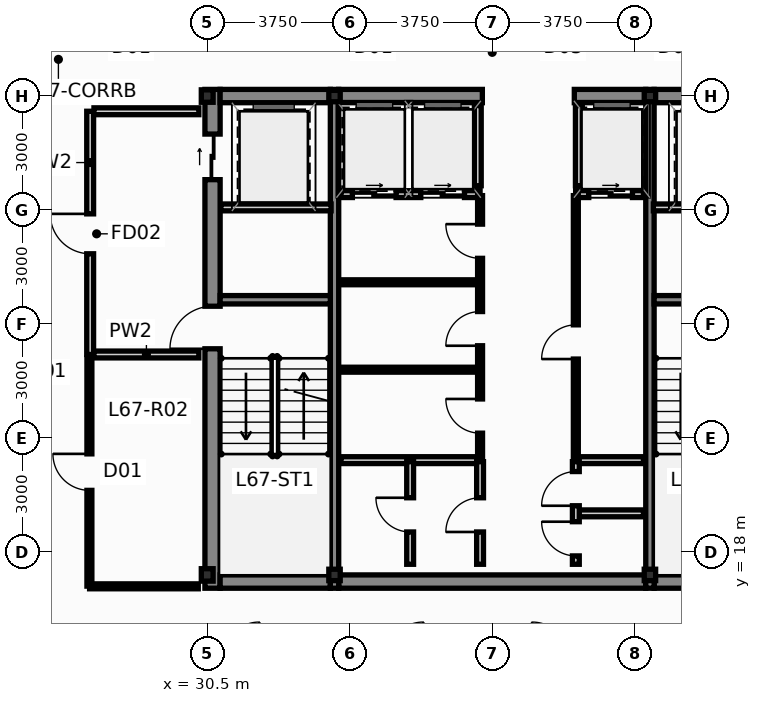
"""IFC4 building model, lengths in metres.
Left out: names, types, materials, properties, quantities, classifications, styles, units other than length and angle.
Written with IfcOpenShell. Run it as: python <this file> out.ifc"""

import sys

from ifc_helpers import new_model, si_unit, direction, frame, frame_2d, origin, origin_2d, place, context, subcontext, project, spatial, rectangle, hollow_rectangle, i_section, extrude, source, transform, mapped, element, fill, save


model = new_model("IFC4")
c1 = context("Model", 3, precision=1e-05, world=origin(), true_north=direction((0.0, 1.0)))
c2 = subcontext(c1, "Body", "Model", "MODEL_VIEW")
j1 = project(units=[si_unit("LENGTHUNIT", "METRE"), si_unit("PLANEANGLEUNIT", "RADIAN")], contexts=[c1])
p1 = place(None, origin())
s1 = spatial("IfcSite", under=j1, at=p1, CompositionType="ELEMENT")
p2 = place(p1, origin())
s2 = spatial("IfcBuilding", under=s1, at=p2, CompositionType="ELEMENT")
p3 = place(p2, frame((0.0, 0.0, 255.4)))
s3 = spatial("IfcBuildingStorey", under=s2, at=p3, CompositionType="ELEMENT", Elevation=255.4)
m1 = source(origin(), c2, "Body", "SweptSolid", [
    extrude(i_section(OverallWidth=0.311, OverallDepth=0.327, WebThickness=0.016, FlangeThickness=0.025, at=origin_2d()), origin(), (0.0, 0.0, 1.0), 3.65),
])
for number, where, z_axis, x_axis in (
    (1, (30.5, 17.4, 0.0), (0.0, 0.0, 1.0), (1.0, 0.0, 0.0)),
    (2, (30.5, 30.0, 0.0), (0.0, 0.0, 1.0), (1.0, 0.0, 0.0)),
):
    element("IfcColumn", number, at=place(p3, frame(where, z_axis=z_axis, x_axis=x_axis)), inside=s3, PredefinedType="COLUMN", context=c2, shape_type="MappedRepresentation", body=[
        mapped(m1, transform((0.0, 0.0, 0.0), scale=1.0)),
    ])
m2 = source(origin(), c2, "Body", "SweptSolid", [
    extrude(hollow_rectangle(XDim=0.3, YDim=0.3, WallThickness=0.012, at=origin_2d()), origin(), (0.0, 0.0, 1.0), 3.65),
])
for number, where, z_axis, x_axis in (
    (3, (33.85, 17.4, 0.0), (0.0, 0.0, 1.0), (1.0, 0.0, 0.0)),
    (4, (42.15, 17.4, 0.0), (0.0, 0.0, 1.0), (1.0, 0.0, 0.0)),
    (5, (33.85, 30.0, 0.0), (0.0, 0.0, 1.0), (1.0, 0.0, 0.0)),
    (6, (42.15, 30.0, 0.0), (0.0, 0.0, 1.0), (1.0, 0.0, 0.0)),
):
    element("IfcColumn", number, at=place(p3, frame(where, z_axis=z_axis, x_axis=x_axis)), inside=s3, PredefinedType="COLUMN", context=c2, shape_type="MappedRepresentation", body=[
        mapped(m2, transform((0.0, 0.0, 0.0), scale=1.0)),
    ])
p4 = place(p3, frame((30.64, 17.05, 0.0), z_axis=(0.0, 0.0, 1.0), x_axis=(0.0, 1.0, 0.0)))
e7 = element("IfcWall", 7, at=p4, inside=s3, PredefinedType="SHEAR", context=c2, shape_type="SweptSolid", body=[
    extrude(rectangle(XDim=13.125, YDim=0.4, at=frame_2d((6.562, 0.0))), origin(), (0.0, 0.0, 1.0), 3.65),
])
p5 = place(p4, frame((6.3, 0.0, 0.0)))
e8 = element("IfcOpeningElement", 8, at=p5, cuts=e7, PredefinedType="OPENING", context=c2, shape_type="SweptSolid", body=[
    extrude(rectangle(XDim=1.12, YDim=2.15, at=frame_2d((0.56, 1.075))), frame((0.0, 0.212, 0.0), z_axis=(0.0, -1.0, 0.0), x_axis=(1.0, 0.0, 0.0)), (0.0, 0.0, 1.0), 0.424),
])
p6 = place(p4, frame((10.75, 0.0, 0.0)))
e9 = element("IfcOpeningElement", 9, at=p6, cuts=e7, PredefinedType="OPENING", context=c2, shape_type="SweptSolid", body=[
    extrude(rectangle(XDim=1.2, YDim=2.2, at=frame_2d((0.6, 1.1))), frame((0.0, 0.212, 0.0), z_axis=(0.0, -1.0, 0.0), x_axis=(1.0, 0.0, 0.0)), (0.0, 0.0, 1.0), 0.424),
])
p7 = place(p3, frame((30.84, 17.225, 0.0), z_axis=(0.0, 0.0, 1.0), x_axis=(1.0, 0.0, 0.0)))
e10 = element("IfcWall", 10, at=p7, inside=s3, PredefinedType="SHEAR", context=c2, shape_type="SweptSolid", body=[
    extrude(rectangle(XDim=2.9, YDim=0.35, at=frame_2d((1.45, 0.0))), origin(), (0.0, 0.0, 1.0), 3.65),
])
p8 = place(p3, frame((33.96, 17.225, 0.0), z_axis=(0.0, 0.0, 1.0), x_axis=(1.0, 0.0, 0.0)))
e11 = element("IfcWall", 11, at=p8, inside=s3, PredefinedType="SHEAR", context=c2, shape_type="SweptSolid", body=[
    extrude(rectangle(XDim=8.08, YDim=0.35, at=frame_2d((4.04, 0.0))), origin(), (0.0, 0.0, 1.0), 3.65),
])
for number, where, z_axis, x_axis in (
    (12, (42.26, 17.225, 0.0), (0.0, 0.0, 1.0), (1.0, 0.0, 0.0)),
    (13, (30.84, 30.0, 0.0), (0.0, 0.0, 1.0), (1.0, 0.0, 0.0)),
):
    element("IfcWall", number, at=place(p3, frame(where, z_axis=z_axis, x_axis=x_axis)), inside=s3, PredefinedType="SHEAR", context=c2, shape_type="SweptSolid", body=[
        extrude(rectangle(XDim=2.9, YDim=0.35, at=frame_2d((1.45, 0.0))), origin(), (0.0, 0.0, 1.0), 3.65),
    ])
p9 = place(p3, frame((33.96, 30.0, 0.0), z_axis=(0.0, 0.0, 1.0), x_axis=(1.0, 0.0, 0.0)))
e14 = element("IfcWall", 14, at=p9, inside=s3, PredefinedType="SHEAR", context=c2, shape_type="SweptSolid", body=[
    extrude(rectangle(XDim=3.78, YDim=0.35, at=frame_2d((1.89, 0.0))), origin(), (0.0, 0.0, 1.0), 3.65),
])
p10 = place(p3, frame((40.16, 30.0, 0.0), z_axis=(0.0, 0.0, 1.0), x_axis=(1.0, 0.0, 0.0)))
e15 = element("IfcWall", 15, at=p10, inside=s3, PredefinedType="SHEAR", context=c2, shape_type="SweptSolid", body=[
    extrude(rectangle(XDim=1.88, YDim=0.35, at=frame_2d((0.94, 0.0))), origin(), (0.0, 0.0, 1.0), 3.65),
])
p11 = place(p3, frame((42.26, 30.0, 0.0), z_axis=(0.0, 0.0, 1.0), x_axis=(1.0, 0.0, 0.0)))
e16 = element("IfcWall", 16, at=p11, inside=s3, PredefinedType="SHEAR", context=c2, shape_type="SweptSolid", body=[
    extrude(rectangle(XDim=2.9, YDim=0.35, at=frame_2d((1.45, 0.0))), origin(), (0.0, 0.0, 1.0), 3.65),
])
for number, where, z_axis, x_axis in (
    (17, (33.85, 17.05, 0.0), (0.0, 0.0, 1.0), (0.0, 1.0, 0.0)),
    (18, (42.15, 17.05, 0.0), (0.0, 0.0, 1.0), (0.0, 1.0, 0.0)),
):
    element("IfcWall", number, at=place(p3, frame(where, z_axis=z_axis, x_axis=x_axis)), inside=s3, PredefinedType="SHEAR", context=c2, shape_type="SweptSolid", body=[
        extrude(rectangle(XDim=13.125, YDim=0.22, at=frame_2d((6.562, 0.0))), origin(), (0.0, 0.0, 1.0), 3.65),
    ])
for number, where, z_axis, x_axis in (
    (19, (30.84, 24.64, 0.0), (0.0, 0.0, 1.0), (1.0, 0.0, 0.0)),
    (20, (42.26, 24.64, 0.0), (0.0, 0.0, 1.0), (1.0, 0.0, 0.0)),
):
    element("IfcWall", number, at=place(p3, frame(where, z_axis=z_axis, x_axis=x_axis)), inside=s3, PredefinedType="SHEAR", context=c2, shape_type="SweptSolid", body=[
        extrude(rectangle(XDim=2.9, YDim=0.22, at=frame_2d((1.45, 0.0))), origin(), (0.0, 0.0, 1.0), 3.65),
    ])
p12 = place(p3, frame((34.02, 27.42, 0.0), z_axis=(0.0, 0.0, 1.0), x_axis=(1.0, 0.0, 0.0)))
e21 = element("IfcWall", 21, at=p12, inside=s3, PredefinedType="PARTITIONING", context=c2, shape_type="SweptSolid", body=[
    extrude(rectangle(XDim=3.66, YDim=0.18, at=frame_2d((1.83, 0.0))), origin(), (0.0, 0.0, 1.0), 3.4),
])
p13 = place(p12, frame((0.3, 0.0, 0.0)))
e22 = element("IfcOpeningElement", 22, at=p13, cuts=e21, PredefinedType="OPENING", context=c2, shape_type="SweptSolid", body=[
    extrude(rectangle(XDim=1.15, YDim=2.2, at=frame_2d((0.575, 1.1))), frame((0.0, 0.102, 0.0), z_axis=(0.0, -1.0, 0.0), x_axis=(1.0, 0.0, 0.0)), (0.0, 0.0, 1.0), 0.204),
])
p14 = place(p12, frame((2.1, 0.0, 0.0)))
e23 = element("IfcOpeningElement", 23, at=p14, cuts=e21, PredefinedType="OPENING", context=c2, shape_type="SweptSolid", body=[
    extrude(rectangle(XDim=1.15, YDim=2.2, at=frame_2d((0.575, 1.1))), frame((0.0, 0.102, 0.0), z_axis=(0.0, -1.0, 0.0), x_axis=(1.0, 0.0, 0.0)), (0.0, 0.0, 1.0), 0.204),
])
p15 = place(p3, frame((40.22, 27.42, 0.0), z_axis=(0.0, 0.0, 1.0), x_axis=(1.0, 0.0, 0.0)))
e24 = element("IfcWall", 24, at=p15, inside=s3, PredefinedType="PARTITIONING", context=c2, shape_type="SweptSolid", body=[
    extrude(rectangle(XDim=1.76, YDim=0.18, at=frame_2d((0.88, 0.0))), origin(), (0.0, 0.0, 1.0), 3.4),
])
p16 = place(p15, frame((0.32, 0.0, 0.0)))
e25 = element("IfcOpeningElement", 25, at=p16, cuts=e24, PredefinedType="OPENING", context=c2, shape_type="SweptSolid", body=[
    extrude(rectangle(XDim=1.15, YDim=2.2, at=frame_2d((0.575, 1.1))), frame((0.0, 0.102, 0.0), z_axis=(0.0, -1.0, 0.0), x_axis=(1.0, 0.0, 0.0)), (0.0, 0.0, 1.0), 0.204),
])
for number, where, z_axis, x_axis in (
    (26, (37.62, 27.64, 0.0), (0.0, 0.0, 1.0), (0.0, 1.0, 0.0)),
    (27, (40.28, 27.64, 0.0), (0.0, 0.0, 1.0), (0.0, 1.0, 0.0)),
):
    element("IfcWall", number, at=place(p3, frame(where, z_axis=z_axis, x_axis=x_axis)), inside=s3, PredefinedType="PARTITIONING", context=c2, shape_type="SweptSolid", body=[
        extrude(rectangle(XDim=2.11, YDim=0.18, at=frame_2d((1.055, 0.0))), origin(), (0.0, 0.0, 1.0), 3.4),
    ])
p17 = place(p3, frame((27.42, 23.2, 0.0), z_axis=(0.0, 0.0, 1.0), x_axis=(0.0, 1.0, 0.0)))
e28 = element("IfcWall", 28, at=p17, inside=s3, PredefinedType="PARTITIONING", context=c2, shape_type="SweptSolid", body=[
    extrude(rectangle(XDim=6.4, YDim=0.18, at=frame_2d((3.2, 0.0))), origin(), (0.0, 0.0, 1.0), 3.085),
])
p18 = place(p17, frame((2.65, 0.0, 0.0)))
e29 = element("IfcOpeningElement", 29, at=p18, cuts=e28, PredefinedType="OPENING", context=c2, shape_type="SweptSolid", body=[
    extrude(rectangle(XDim=1.05, YDim=2.15, at=frame_2d((0.525, 1.075))), frame((0.0, 0.102, 0.0), z_axis=(0.0, -1.0, 0.0), x_axis=(1.0, 0.0, 0.0)), (0.0, 0.0, 1.0), 0.204),
])
for number, where, z_axis, x_axis in (
    (30, (27.52, 23.2, 0.0), (0.0, 0.0, 1.0), (1.0, 0.0, 0.0)),
    (31, (27.52, 29.6, 0.0), (0.0, 0.0, 1.0), (1.0, 0.0, 0.0)),
):
    element("IfcWall", number, at=place(p3, frame(where, z_axis=z_axis, x_axis=x_axis)), inside=s3, PredefinedType="PARTITIONING", context=c2, shape_type="SweptSolid", body=[
        extrude(rectangle(XDim=2.76, YDim=0.18, at=frame_2d((1.38, 0.0))), origin(), (0.0, 0.0, 1.0), 3.4),
    ])
for number, where, z_axis, x_axis in (
    (32, (30.86, 27.07, 0.0), (0.0, 0.0, 1.0), (1.0, 0.0, 0.0)),
    (33, (42.24, 27.07, 0.0), (0.0, 0.0, 1.0), (1.0, 0.0, 0.0)),
):
    element("IfcWall", number, at=place(p3, frame(where, z_axis=z_axis, x_axis=x_axis)), inside=s3, PredefinedType="PARTITIONING", context=c2, shape_type="SweptSolid", body=[
        extrude(rectangle(XDim=2.9, YDim=0.18, at=frame_2d((1.45, 0.0))), origin(), (0.0, 0.0, 1.0), 3.4),
    ])
p19 = place(p3, frame((34.02, 20.42, 0.0), z_axis=(0.0, 0.0, 1.0), x_axis=(1.0, 0.0, 0.0)))
e34 = element("IfcWall", 34, at=p19, inside=s3, PredefinedType="PARTITIONING", context=c2, shape_type="SweptSolid", body=[
    extrude(rectangle(XDim=3.64, YDim=0.18, at=frame_2d((1.82, 0.0))), origin(), (0.0, 0.0, 1.0), 3.4),
])
p20 = place(p3, frame((40.22, 20.42, 0.0), z_axis=(0.0, 0.0, 1.0), x_axis=(1.0, 0.0, 0.0)))
e35 = element("IfcWall", 35, at=p20, inside=s3, PredefinedType="PARTITIONING", context=c2, shape_type="SweptSolid", body=[
    extrude(rectangle(XDim=1.76, YDim=0.18, at=frame_2d((0.88, 0.0))), origin(), (0.0, 0.0, 1.0), 3.4),
])
for number, where, z_axis, x_axis in (
    (36, (34.02, 22.8, 0.0), (0.0, 0.0, 1.0), (1.0, 0.0, 0.0)),
    (37, (34.02, 25.1, 0.0), (0.0, 0.0, 1.0), (1.0, 0.0, 0.0)),
):
    element("IfcWall", number, at=place(p3, frame(where, z_axis=z_axis, x_axis=x_axis)), inside=s3, PredefinedType="PARTITIONING", context=c2, shape_type="SweptSolid", body=[
        extrude(rectangle(XDim=3.58, YDim=0.13, at=frame_2d((1.79, 0.0))), origin(), (0.0, 0.0, 1.0), 3.4),
    ])
p21 = place(p3, frame((37.68, 20.48, 0.0), z_axis=(0.0, 0.0, 1.0), x_axis=(0.0, 1.0, 0.0)))
e38 = element("IfcWall", 38, at=p21, inside=s3, PredefinedType="PARTITIONING", context=c2, shape_type="SweptSolid", body=[
    extrude(rectangle(XDim=6.9, YDim=0.13, at=frame_2d((3.45, 0.0))), origin(), (0.0, 0.0, 1.0), 3.4),
])
p22 = place(p21, frame((0.65, 0.0, 0.0)))
e39 = element("IfcOpeningElement", 39, at=p22, cuts=e38, PredefinedType="OPENING", context=c2, shape_type="SweptSolid", body=[
    extrude(rectangle(XDim=0.9, YDim=2.1, at=frame_2d((0.45, 1.05))), frame((0.0, 0.077, 0.0), z_axis=(0.0, -1.0, 0.0), x_axis=(1.0, 0.0, 0.0)), (0.0, 0.0, 1.0), 0.154),
])
p23 = place(p21, frame((2.95, 0.0, 0.0)))
e40 = element("IfcOpeningElement", 40, at=p23, cuts=e38, PredefinedType="OPENING", context=c2, shape_type="SweptSolid", body=[
    extrude(rectangle(XDim=0.9, YDim=2.1, at=frame_2d((0.45, 1.05))), frame((0.0, 0.077, 0.0), z_axis=(0.0, -1.0, 0.0), x_axis=(1.0, 0.0, 0.0)), (0.0, 0.0, 1.0), 0.154),
])
p24 = place(p21, frame((5.25, 0.0, 0.0)))
e41 = element("IfcOpeningElement", 41, at=p24, cuts=e38, PredefinedType="OPENING", context=c2, shape_type="SweptSolid", body=[
    extrude(rectangle(XDim=0.9, YDim=2.1, at=frame_2d((0.45, 1.05))), frame((0.0, 0.077, 0.0), z_axis=(0.0, -1.0, 0.0), x_axis=(1.0, 0.0, 0.0)), (0.0, 0.0, 1.0), 0.154),
])
p25 = place(p3, frame((40.2, 20.48, 0.0), z_axis=(0.0, 0.0, 1.0), x_axis=(0.0, 1.0, 0.0)))
e42 = element("IfcWall", 42, at=p25, inside=s3, PredefinedType="PARTITIONING", context=c2, shape_type="SweptSolid", body=[
    extrude(rectangle(XDim=6.9, YDim=0.13, at=frame_2d((3.45, 0.0))), origin(), (0.0, 0.0, 1.0), 3.4),
])
p26 = place(p25, frame((2.6, 0.0, 0.0)))
e43 = element("IfcOpeningElement", 43, at=p26, cuts=e42, PredefinedType="OPENING", context=c2, shape_type="SweptSolid", body=[
    extrude(rectangle(XDim=0.9, YDim=2.1, at=frame_2d((0.45, 1.05))), frame((0.0, 0.077, 0.0), z_axis=(0.0, -1.0, 0.0), x_axis=(1.0, 0.0, 0.0)), (0.0, 0.0, 1.0), 0.154),
])
p27 = place(p3, frame((35.84, 17.68, 0.0), z_axis=(0.0, 0.0, 1.0), x_axis=(0.0, 1.0, 0.0)))
e44 = element("IfcWall", 44, at=p27, inside=s3, PredefinedType="PARTITIONING", context=c2, shape_type="SweptSolid", body=[
    extrude(rectangle(XDim=2.7, YDim=0.18, at=frame_2d((1.35, 0.0))), origin(), (0.0, 0.0, 1.0), 3.4),
])
p28 = place(p27, frame((0.85, 0.0, 0.0)))
e45 = element("IfcOpeningElement", 45, at=p28, cuts=e44, PredefinedType="OPENING", context=c2, shape_type="SweptSolid", body=[
    extrude(rectangle(XDim=0.9, YDim=2.1, at=frame_2d((0.45, 1.05))), frame((0.0, 0.102, 0.0), z_axis=(0.0, -1.0, 0.0), x_axis=(1.0, 0.0, 0.0)), (0.0, 0.0, 1.0), 0.204),
])
p29 = place(p3, frame((37.68, 17.68, 0.0), z_axis=(0.0, 0.0, 1.0), x_axis=(0.0, 1.0, 0.0)))
e46 = element("IfcWall", 46, at=p29, inside=s3, PredefinedType="PARTITIONING", context=c2, shape_type="SweptSolid", body=[
    extrude(rectangle(XDim=2.7, YDim=0.18, at=frame_2d((1.35, 0.0))), origin(), (0.0, 0.0, 1.0), 3.4),
])
p30 = place(p29, frame((0.85, 0.0, 0.0)))
e47 = element("IfcOpeningElement", 47, at=p30, cuts=e46, PredefinedType="OPENING", context=c2, shape_type="SweptSolid", body=[
    extrude(rectangle(XDim=0.9, YDim=2.1, at=frame_2d((0.45, 1.05))), frame((0.0, 0.102, 0.0), z_axis=(0.0, -1.0, 0.0), x_axis=(1.0, 0.0, 0.0)), (0.0, 0.0, 1.0), 0.204),
])
p31 = place(p3, frame((40.28, 19.02, 0.0), z_axis=(0.0, 0.0, 1.0), x_axis=(1.0, 0.0, 0.0)))
e48 = element("IfcWall", 48, at=p31, inside=s3, PredefinedType="PARTITIONING", context=c2, shape_type="SweptSolid", body=[
    extrude(rectangle(XDim=1.7, YDim=0.18, at=frame_2d((0.85, 0.0))), origin(), (0.0, 0.0, 1.0), 3.4),
])
p32 = place(p3, frame((40.2, 17.68, 0.0), z_axis=(0.0, 0.0, 1.0), x_axis=(0.0, 1.0, 0.0)))
e49 = element("IfcWall", 49, at=p32, inside=s3, PredefinedType="PARTITIONING", context=c2, shape_type="SweptSolid", body=[
    extrude(rectangle(XDim=2.7, YDim=0.18, at=frame_2d((1.35, 0.0))), origin(), (0.0, 0.0, 1.0), 3.4),
])
p33 = place(p32, frame((0.22, 0.0, 0.0)))
e50 = element("IfcOpeningElement", 50, at=p33, cuts=e49, PredefinedType="OPENING", context=c2, shape_type="SweptSolid", body=[
    extrude(rectangle(XDim=0.9, YDim=2.1, at=frame_2d((0.45, 1.05))), frame((0.0, 0.102, 0.0), z_axis=(0.0, -1.0, 0.0), x_axis=(1.0, 0.0, 0.0)), (0.0, 0.0, 1.0), 0.204),
])
p34 = place(p32, frame((1.54, 0.0, 0.0)))
e51 = element("IfcOpeningElement", 51, at=p34, cuts=e49, PredefinedType="OPENING", context=c2, shape_type="SweptSolid", body=[
    extrude(rectangle(XDim=0.9, YDim=2.1, at=frame_2d((0.45, 1.05))), frame((0.0, 0.102, 0.0), z_axis=(0.0, -1.0, 0.0), x_axis=(1.0, 0.0, 0.0)), (0.0, 0.0, 1.0), 0.204),
])
p35 = place(p3, frame((27.4, 17.105, 0.0), z_axis=(0.0, 0.0, 1.0), x_axis=(0.0, 1.0, 0.0)))
e52 = element("IfcWall", 52, at=p35, inside=s3, PredefinedType="PARTITIONING", context=c2, shape_type="SweptSolid", body=[
    extrude(rectangle(XDim=6.0, YDim=0.13, at=frame_2d((3.0, 0.0))), origin(), (0.0, 0.0, 1.0), 3.085),
])
p36 = place(p35, frame((2.52, 0.0, 0.0)))
e53 = element("IfcOpeningElement", 53, at=p36, cuts=e52, PredefinedType="OPENING", context=c2, shape_type="SweptSolid", body=[
    extrude(rectangle(XDim=0.96, YDim=2.15, at=frame_2d((0.48, 1.075))), frame((0.0, 0.077, 0.0), z_axis=(0.0, -1.0, 0.0), x_axis=(1.0, 0.0, 0.0)), (0.0, 0.0, 1.0), 0.154),
])
p37 = place(p3, frame((30.265, 17.1, 0.0), z_axis=(0.0, 0.0, 1.0), x_axis=(-1.0, 0.0, 0.0)))
e54 = element("IfcWall", 54, at=p37, inside=s3, PredefinedType="PARTITIONING", context=c2, shape_type="SweptSolid", body=[
    extrude(rectangle(XDim=2.86, YDim=0.13, at=frame_2d((1.43, 0.0))), origin(), (0.0, 0.0, 1.0), 2.985),
])
p38 = place(p5, origin())
e55 = element("IfcDoor", 55, at=p38, inside=s3, OperationType="SINGLE_SWING_LEFT", PredefinedType="DOOR", context=c2, shape_type="SweptSolid", body=[
    extrude(rectangle(XDim=1.12, YDim=2.15, at=frame_2d((0.56, 1.075))), frame((0.0, 0.025, 0.0), z_axis=(0.0, -1.0, 0.0), x_axis=(1.0, 0.0, 0.0)), (0.0, 0.0, 1.0), 0.05),
])
fill(e8, e55)
p39 = place(p6, origin())
e56 = element("IfcDoor", 56, at=p39, inside=s3, OperationType="SLIDING_TO_LEFT", PredefinedType="DOOR", context=c2, shape_type="SweptSolid", body=[
    extrude(rectangle(XDim=1.2, YDim=2.2, at=frame_2d((0.6, 1.1))), frame((0.0, 0.025, 0.0), z_axis=(0.0, -1.0, 0.0), x_axis=(1.0, 0.0, 0.0)), (0.0, 0.0, 1.0), 0.05),
])
fill(e9, e56)
p40 = place(p13, origin())
e57 = element("IfcDoor", 57, at=p40, inside=s3, OperationType="SLIDING_TO_RIGHT", PredefinedType="DOOR", context=c2, shape_type="SweptSolid", body=[
    extrude(rectangle(XDim=1.15, YDim=2.2, at=frame_2d((0.575, 1.1))), frame((0.0, 0.025, 0.0), z_axis=(0.0, -1.0, 0.0), x_axis=(1.0, 0.0, 0.0)), (0.0, 0.0, 1.0), 0.05),
])
fill(e22, e57)
p41 = place(p14, origin())
e58 = element("IfcDoor", 58, at=p41, inside=s3, OperationType="SLIDING_TO_LEFT", PredefinedType="DOOR", context=c2, shape_type="SweptSolid", body=[
    extrude(rectangle(XDim=1.15, YDim=2.2, at=frame_2d((0.575, 1.1))), frame((0.0, 0.025, 0.0), z_axis=(0.0, -1.0, 0.0), x_axis=(1.0, 0.0, 0.0)), (0.0, 0.0, 1.0), 0.05),
])
fill(e23, e58)
p42 = place(p16, origin())
e59 = element("IfcDoor", 59, at=p42, inside=s3, OperationType="SLIDING_TO_RIGHT", PredefinedType="DOOR", context=c2, shape_type="SweptSolid", body=[
    extrude(rectangle(XDim=1.15, YDim=2.2, at=frame_2d((0.575, 1.1))), frame((0.0, 0.025, 0.0), z_axis=(0.0, -1.0, 0.0), x_axis=(1.0, 0.0, 0.0)), (0.0, 0.0, 1.0), 0.05),
])
fill(e25, e59)
p43 = place(p18, origin())
e60 = element("IfcDoor", 60, at=p43, inside=s3, OperationType="SINGLE_SWING_RIGHT", PredefinedType="DOOR", context=c2, shape_type="SweptSolid", body=[
    extrude(rectangle(XDim=1.05, YDim=2.15, at=frame_2d((0.525, 1.075))), frame((0.0, 0.025, 0.0), z_axis=(0.0, -1.0, 0.0), x_axis=(1.0, 0.0, 0.0)), (0.0, 0.0, 1.0), 0.05),
])
fill(e29, e60)
p44 = place(p22, origin())
e61 = element("IfcDoor", 61, at=p44, inside=s3, OperationType="SINGLE_SWING_RIGHT", PredefinedType="DOOR", context=c2, shape_type="SweptSolid", body=[
    extrude(rectangle(XDim=0.9, YDim=2.1, at=frame_2d((0.45, 1.05))), frame((0.0, 0.025, 0.0), z_axis=(0.0, -1.0, 0.0), x_axis=(1.0, 0.0, 0.0)), (0.0, 0.0, 1.0), 0.05),
])
fill(e39, e61)
p45 = place(p23, origin())
e62 = element("IfcDoor", 62, at=p45, inside=s3, OperationType="SINGLE_SWING_LEFT", PredefinedType="DOOR", context=c2, shape_type="SweptSolid", body=[
    extrude(rectangle(XDim=0.9, YDim=2.1, at=frame_2d((0.45, 1.05))), frame((0.0, 0.025, 0.0), z_axis=(0.0, -1.0, 0.0), x_axis=(1.0, 0.0, 0.0)), (0.0, 0.0, 1.0), 0.05),
])
fill(e40, e62)
p46 = place(p24, origin())
e63 = element("IfcDoor", 63, at=p46, inside=s3, OperationType="SINGLE_SWING_RIGHT", PredefinedType="DOOR", context=c2, shape_type="SweptSolid", body=[
    extrude(rectangle(XDim=0.9, YDim=2.1, at=frame_2d((0.45, 1.05))), frame((0.0, 0.025, 0.0), z_axis=(0.0, -1.0, 0.0), x_axis=(1.0, 0.0, 0.0)), (0.0, 0.0, 1.0), 0.05),
])
fill(e41, e63)
p47 = place(p26, origin())
e64 = element("IfcDoor", 64, at=p47, inside=s3, OperationType="SINGLE_SWING_LEFT", PredefinedType="DOOR", context=c2, shape_type="SweptSolid", body=[
    extrude(rectangle(XDim=0.9, YDim=2.1, at=frame_2d((0.45, 1.05))), frame((0.0, 0.025, 0.0), z_axis=(0.0, -1.0, 0.0), x_axis=(1.0, 0.0, 0.0)), (0.0, 0.0, 1.0), 0.05),
])
fill(e43, e64)
p48 = place(p28, origin())
e65 = element("IfcDoor", 65, at=p48, inside=s3, OperationType="SINGLE_SWING_RIGHT", PredefinedType="DOOR", context=c2, shape_type="SweptSolid", body=[
    extrude(rectangle(XDim=0.9, YDim=2.1, at=frame_2d((0.45, 1.05))), frame((0.0, 0.025, 0.0), z_axis=(0.0, -1.0, 0.0), x_axis=(1.0, 0.0, 0.0)), (0.0, 0.0, 1.0), 0.05),
])
fill(e45, e65)
p49 = place(p30, origin())
e66 = element("IfcDoor", 66, at=p49, inside=s3, OperationType="SINGLE_SWING_LEFT", PredefinedType="DOOR", context=c2, shape_type="SweptSolid", body=[
    extrude(rectangle(XDim=0.9, YDim=2.1, at=frame_2d((0.45, 1.05))), frame((0.0, 0.025, 0.0), z_axis=(0.0, -1.0, 0.0), x_axis=(1.0, 0.0, 0.0)), (0.0, 0.0, 1.0), 0.05),
])
fill(e47, e66)
p50 = place(p33, origin())
e67 = element("IfcDoor", 67, at=p50, inside=s3, OperationType="SINGLE_SWING_RIGHT", PredefinedType="DOOR", context=c2, shape_type="SweptSolid", body=[
    extrude(rectangle(XDim=0.9, YDim=2.1, at=frame_2d((0.45, 1.05))), frame((0.0, 0.025, 0.0), z_axis=(0.0, -1.0, 0.0), x_axis=(1.0, 0.0, 0.0)), (0.0, 0.0, 1.0), 0.05),
])
fill(e50, e67)
p51 = place(p34, origin())
e68 = element("IfcDoor", 68, at=p51, inside=s3, OperationType="SINGLE_SWING_LEFT", PredefinedType="DOOR", context=c2, shape_type="SweptSolid", body=[
    extrude(rectangle(XDim=0.9, YDim=2.1, at=frame_2d((0.45, 1.05))), frame((0.0, 0.025, 0.0), z_axis=(0.0, -1.0, 0.0), x_axis=(1.0, 0.0, 0.0)), (0.0, 0.0, 1.0), 0.05),
])
fill(e51, e68)
p52 = place(p36, origin())
e69 = element("IfcDoor", 69, at=p52, inside=s3, OperationType="SINGLE_SWING_RIGHT", PredefinedType="DOOR", context=c2, shape_type="SweptSolid", body=[
    extrude(rectangle(XDim=0.96, YDim=2.15, at=frame_2d((0.48, 1.075))), frame((0.0, 0.025, 0.0), z_axis=(0.0, -1.0, 0.0), x_axis=(1.0, 0.0, 0.0)), (0.0, 0.0, 1.0), 0.05),
])
fill(e53, e69)
save(model, sys.argv[1])
